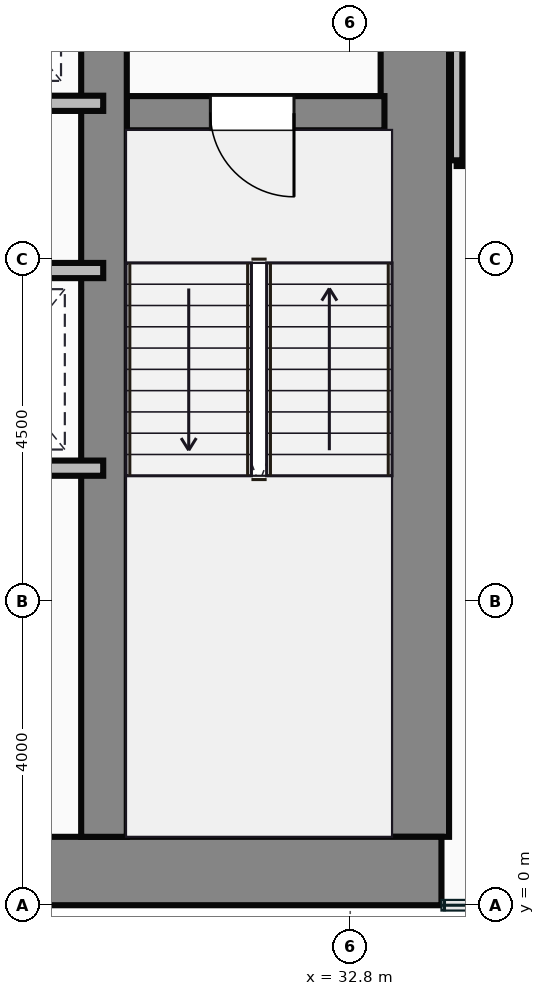
"""IFC4 building model, lengths in metres.
Left out: names, types, materials, properties, quantities, classifications, styles, units other than length and angle.
Written with IfcOpenShell. Run it as: python <this file> out.ifc"""

import sys

from ifc_helpers import new_model, si_unit, direction, frame, frame_2d, origin, place, context, subcontext, project, spatial, rectangle, extrude, source, transform, mapped, element, fill, save


model = new_model("IFC4")
c1 = context("Model", 3, precision=1e-05, world=origin(), true_north=direction((0.0, 1.0)))
c2 = subcontext(c1, "Body", "Model", "MODEL_VIEW")
j1 = project(units=[si_unit("LENGTHUNIT", "METRE"), si_unit("PLANEANGLEUNIT", "RADIAN")], contexts=[c1])
p1 = place(None, origin())
s1 = spatial("IfcSite", under=j1, at=p1, CompositionType="ELEMENT")
p2 = place(p1, origin())
s2 = spatial("IfcBuilding", under=s1, at=p2, CompositionType="ELEMENT")
p3 = place(p2, frame((0.0, 0.0, 50.75)))
s3 = spatial("IfcBuildingStorey", under=s2, at=p3, CompositionType="ELEMENT", Elevation=50.75)
m1 = source(origin(), c2, "Body", "SweptSolid", [
    extrude(rectangle(XDim=29.5, YDim=0.9, at=frame_2d((14.75, 0.0))), origin(), (0.0, 0.0, 1.0), 3.65),
])
p4 = place(p3, frame((4.5, 0.45, 0.0), z_axis=(0.0, 0.0, 1.0), x_axis=(1.0, 0.0, 0.0)))
e1 = element("IfcWall", 1, at=p4, inside=s3, PredefinedType="SHEAR", context=c2, shape_type="MappedRepresentation", body=[
    mapped(m1, transform((0.0, 0.0, 0.0))),
])
m2 = source(origin(), c2, "Body", "SweptSolid", [
    extrude(rectangle(XDim=13.1, YDim=0.9, at=frame_2d((6.55, 0.0))), origin(), (0.0, 0.0, 1.0), 3.65),
])
p5 = place(p3, frame((33.65, 0.9, 0.0), z_axis=(0.0, 0.0, 1.0), x_axis=(0.0, 1.0, 0.0)))
e2 = element("IfcWall", 2, at=p5, inside=s3, PredefinedType="SHEAR", context=c2, shape_type="MappedRepresentation", body=[
    mapped(m2, transform((0.0, 0.0, 0.0))),
])
m3 = source(origin(), c2, "Body", "SweptSolid", [
    extrude(rectangle(XDim=12.2, YDim=0.6, at=frame_2d((6.1, 0.0))), origin(), (0.0, 0.0, 1.0), 3.65),
])
p6 = place(p3, frame((29.56, 0.9, 0.0), z_axis=(0.0, 0.0, 1.0), x_axis=(0.0, 1.0, 0.0)))
e3 = element("IfcWall", 3, at=p6, inside=s3, PredefinedType="SHEAR", context=c2, shape_type="MappedRepresentation", body=[
    mapped(m3, transform((0.0, 0.0, 0.0))),
])
m4 = source(origin(), c2, "Body", "SweptSolid", [
    extrude(rectangle(XDim=3.39, YDim=0.45, at=frame_2d((1.695, 0.0))), origin(), (0.0, 0.0, 1.0), 3.65),
])
p7 = place(p3, frame((29.86, 10.42, 0.0), z_axis=(0.0, 0.0, 1.0), x_axis=(1.0, 0.0, 0.0)))
e4 = element("IfcWall", 4, at=p7, inside=s3, PredefinedType="SHEAR", context=c2, shape_type="MappedRepresentation", body=[
    mapped(m4, transform((0.0, 0.0, 0.0))),
])
p8 = place(p7, frame((1.1, 0.0, 0.0)))
e5 = element("IfcOpeningElement", 5, at=p8, cuts=e4, PredefinedType="OPENING", context=c2, shape_type="SweptSolid", body=[
    extrude(rectangle(XDim=1.1, YDim=2.15, at=frame_2d((0.55, 1.075))), frame((0.0, 0.235, 0.0), z_axis=(0.0, -1.0, 0.0), x_axis=(1.0, 0.0, 0.0)), (0.0, 0.0, 1.0), 0.47),
])
m5 = source(origin(), c2, "Body", "SweptSolid", [
    extrude(rectangle(XDim=8.8, YDim=0.2, at=frame_2d((4.4, 0.0))), origin(), (0.0, 0.0, 1.0), 3.4),
])
p9 = place(p3, frame((20.75, 10.55, 0.0), z_axis=(0.0, 0.0, 1.0), x_axis=(1.0, 0.0, 0.0)))
e6 = element("IfcWall", 6, at=p9, inside=s3, PredefinedType="PARTITIONING", context=c2, shape_type="MappedRepresentation", body=[
    mapped(m5, transform((0.0, 0.0, 0.0))),
])
m6 = source(origin(), c2, "Body", "SweptSolid", [
    extrude(rectangle(XDim=4.55, YDim=0.2, at=frame_2d((2.275, 0.0))), origin(), (0.0, 0.0, 1.0), 3.4),
])
for number, where, z_axis, x_axis in (
    (7, (25.0, 8.35, 0.0), (0.0, 0.0, 1.0), (1.0, 0.0, 0.0)),
    (8, (25.0, 5.75, 0.0), (0.0, 0.0, 1.0), (1.0, 0.0, 0.0)),
):
    element("IfcWall", number, at=place(p3, frame(where, z_axis=z_axis, x_axis=x_axis)), inside=s3, PredefinedType="PARTITIONING", context=c2, shape_type="MappedRepresentation", body=[
        mapped(m6, transform((0.0, 0.0, 0.0))),
    ])
m7 = source(origin(), c2, "Body", "SweptSolid", [
    extrude(rectangle(XDim=4.8, YDim=0.15, at=frame_2d((2.4, 0.0))), origin(), (0.0, 0.0, 1.0), 3.4),
])
p10 = place(p3, frame((34.2, 9.8, 0.0), z_axis=(0.0, 0.0, 1.0), x_axis=(1.0, 0.0, 0.0)))
e9 = element("IfcWall", 9, at=p10, inside=s3, PredefinedType="PARTITIONING", context=c2, shape_type="MappedRepresentation", body=[
    mapped(m7, transform((0.0, 0.0, 0.0))),
])
m8 = source(origin(), c2, "Body", "SweptSolid", [
    extrude(rectangle(XDim=4.18, YDim=0.15, at=frame_2d((2.09, 0.0))), origin(), (0.0, 0.0, 1.0), 3.4),
])
p11 = place(p3, frame((34.2, 9.8, 0.0), z_axis=(0.0, 0.0, 1.0), x_axis=(0.0, 1.0, 0.0)))
e10 = element("IfcWall", 10, at=p11, inside=s3, PredefinedType="PARTITIONING", context=c2, shape_type="MappedRepresentation", body=[
    mapped(m8, transform((0.0, 0.0, 0.0))),
])
m9 = source(origin(), c2, "Body", "SweptSolid", [
    extrude(rectangle(XDim=1.1, YDim=2.15, at=frame_2d((0.55, 1.075))), frame((0.0, 0.025, 0.0), z_axis=(0.0, -1.0, 0.0), x_axis=(1.0, 0.0, 0.0)), (0.0, 0.0, 1.0), 0.05),
])
p12 = place(p8, frame((1.1, 0.0, 0.0), z_axis=(0.0, 0.0, 1.0), x_axis=(-1.0, 0.0, 0.0)))
e11 = element("IfcDoor", 11, at=p12, inside=s3, OperationType="SINGLE_SWING_RIGHT", PredefinedType="DOOR", context=c2, shape_type="MappedRepresentation", body=[
    mapped(m9, transform((0.0, 0.0, 0.0))),
])
fill(e5, e11)
save(model, sys.argv[1])
